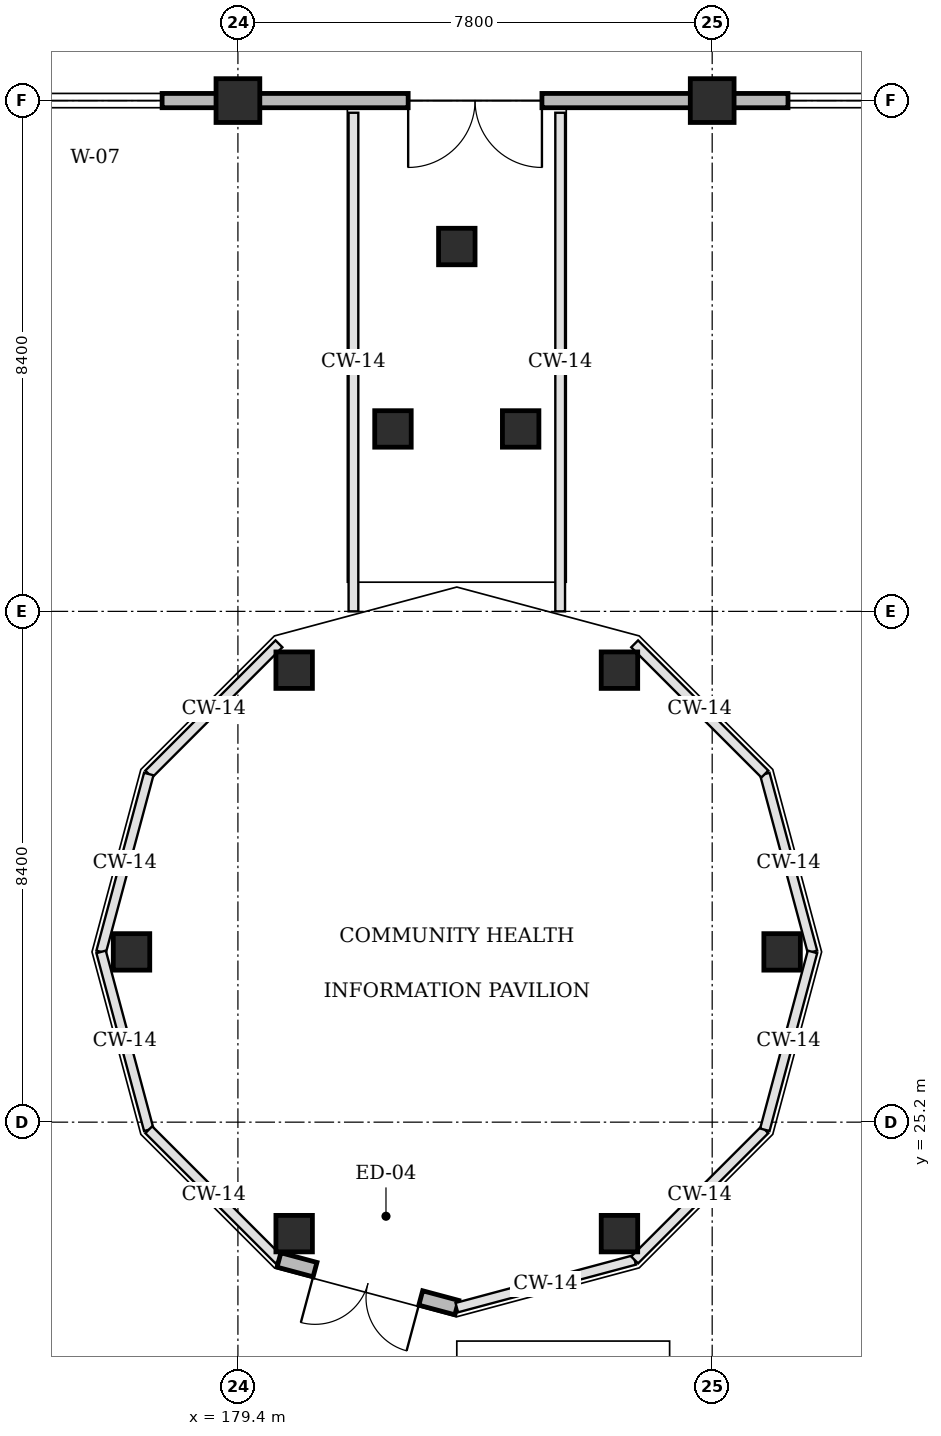
"""IFC4 building model, lengths in metres.
Left out: names, types, materials, properties, quantities, classifications, styles, units other than length and angle.
Written with IfcOpenShell. Run it as: python <this file> out.ifc"""

import sys

from ifc_helpers import new_model, si_unit, direction, frame, frame_2d, origin, origin_2d, place, context, subcontext, project, spatial, rectangle, circle, extrude, element, fill, save


model = new_model("IFC4")
c1 = context("Model", 3, precision=1e-05, world=origin(), true_north=direction((0.0, 1.0)))
c2 = subcontext(c1, "Body", "Model", "MODEL_VIEW")
j1 = project(units=[si_unit("LENGTHUNIT", "METRE"), si_unit("PLANEANGLEUNIT", "RADIAN")], contexts=[c1])
p1 = place(None, origin())
s1 = spatial("IfcSite", under=j1, at=p1, CompositionType="ELEMENT")
p2 = place(p1, origin())
s2 = spatial("IfcBuilding", under=s1, at=p2, CompositionType="ELEMENT")
p3 = place(p2, origin())
s3 = spatial("IfcBuildingStorey", under=s2, at=p3, CompositionType="ELEMENT", Elevation=0.0)
for number, where, z_axis, x_axis in (
    (1, (179.4, 42.0, 0.0), (0.0, 0.0, 1.0), (1.0, 0.0, 0.0)),
    (2, (187.2, 42.0, 0.0), (0.0, 0.0, 1.0), (1.0, 0.0, 0.0)),
):
    element("IfcColumn", number, at=place(p3, frame(where, z_axis=z_axis, x_axis=x_axis)), inside=s3, PredefinedType="COLUMN", context=c2, shape_type="SweptSolid", body=[
        extrude(rectangle(XDim=0.72, YDim=0.72, at=origin_2d()), origin(), (0.0, 0.0, 1.0), 4.8),
    ])
for number, where, z_axis, x_axis in (
    (3, (188.35, 28.0, -0.3), (0.0, 0.0, 1.0), (1.0, 0.0, 0.0)),
    (4, (185.675, 32.633, -0.3), (0.0, 0.0, 1.0), (1.0, 0.0, 0.0)),
    (5, (180.325, 32.633, -0.3), (0.0, 0.0, 1.0), (1.0, 0.0, 0.0)),
    (6, (177.65, 28.0, -0.3), (0.0, 0.0, 1.0), (1.0, 0.0, 0.0)),
    (7, (180.325, 23.367, -0.3), (0.0, 0.0, 1.0), (1.0, 0.0, 0.0)),
    (8, (185.675, 23.367, -0.3), (0.0, 0.0, 1.0), (1.0, 0.0, 0.0)),
):
    element("IfcColumn", number, at=place(p3, frame(where, z_axis=z_axis, x_axis=x_axis)), inside=s3, PredefinedType="PILASTER", context=c2, shape_type="SweptSolid", body=[
        extrude(circle(Radius=0.3, at=origin_2d()), origin(), (0.0, 0.0, 1.0), 4.84),
    ])
for number, where, z_axis, x_axis in (
    (9, (181.95, 36.6, -0.3), (0.0, 0.0, 1.0), (1.0, 0.0, 0.0)),
    (10, (184.05, 36.6, -0.3), (0.0, 0.0, 1.0), (1.0, 0.0, 0.0)),
    (11, (183.0, 39.6, -0.3), (0.0, 0.0, 1.0), (1.0, 0.0, 0.0)),
):
    element("IfcColumn", number, at=place(p3, frame(where, z_axis=z_axis, x_axis=x_axis)), inside=s3, PredefinedType="PILASTER", context=c2, shape_type="SweptSolid", body=[
        extrude(circle(Radius=0.3, at=origin_2d()), origin(), (0.0, 0.0, 1.0), 4.58),
    ])
p4 = place(p3, frame((179.06, 42.0, 0.0), z_axis=(0.0, 0.0, 1.0), x_axis=(-1.0, 0.0, 0.0)))
e12 = element("IfcWall", 12, at=p4, inside=s3, PredefinedType="STANDARD", context=c2, shape_type="SweptSolid", body=[
    extrude(rectangle(XDim=7.12, YDim=0.235, at=frame_2d((3.56, 0.0))), origin(), (0.0, 0.0, 1.0), 3.63),
])
p5 = place(p4, frame((0.907, 0.0, 0.9)))
e13 = element("IfcOpeningElement", 13, at=p5, cuts=e12, PredefinedType="OPENING", context=c2, shape_type="SweptSolid", body=[
    extrude(rectangle(XDim=2.2, YDim=1.65, at=frame_2d((1.1, 0.825))), frame((0.0, 0.127, 0.0), z_axis=(0.0, -1.0, 0.0), x_axis=(1.0, 0.0, 0.0)), (0.0, 0.0, 1.0), 0.255),
])
p6 = place(p4, frame((4.013, 0.0, 0.9)))
e14 = element("IfcOpeningElement", 14, at=p6, cuts=e12, PredefinedType="OPENING", context=c2, shape_type="SweptSolid", body=[
    extrude(rectangle(XDim=2.2, YDim=1.65, at=frame_2d((1.1, 0.825))), frame((0.0, 0.127, 0.0), z_axis=(0.0, -1.0, 0.0), x_axis=(1.0, 0.0, 0.0)), (0.0, 0.0, 1.0), 0.255),
])
p7 = place(p3, frame((186.86, 42.0, 0.0), z_axis=(0.0, 0.0, 1.0), x_axis=(-1.0, 0.0, 0.0)))
e15 = element("IfcWall", 15, at=p7, inside=s3, PredefinedType="STANDARD", context=c2, shape_type="SweptSolid", body=[
    extrude(rectangle(XDim=7.12, YDim=0.235, at=frame_2d((3.56, 0.0))), origin(), (0.0, 0.0, 1.0), 3.63),
])
p8 = place(p7, frame((2.46, 0.0, 0.0)))
e16 = element("IfcOpeningElement", 16, at=p8, cuts=e15, PredefinedType="OPENING", context=c2, shape_type="SweptSolid", body=[
    extrude(rectangle(XDim=2.2, YDim=2.35, at=frame_2d((1.1, 1.175))), frame((0.0, 0.127, 0.0), z_axis=(0.0, -1.0, 0.0), x_axis=(1.0, 0.0, 0.0)), (0.0, 0.0, 1.0), 0.255),
])
p9 = place(p3, frame((194.66, 42.0, 0.0), z_axis=(0.0, 0.0, 1.0), x_axis=(-1.0, 0.0, 0.0)))
e17 = element("IfcWall", 17, at=p9, inside=s3, PredefinedType="STANDARD", context=c2, shape_type="SweptSolid", body=[
    extrude(rectangle(XDim=7.12, YDim=0.235, at=frame_2d((3.56, 0.0))), origin(), (0.0, 0.0, 1.0), 3.63),
])
p10 = place(p9, frame((0.907, 0.0, 0.9)))
e18 = element("IfcOpeningElement", 18, at=p10, cuts=e17, PredefinedType="OPENING", context=c2, shape_type="SweptSolid", body=[
    extrude(rectangle(XDim=2.2, YDim=1.65, at=frame_2d((1.1, 0.825))), frame((0.0, 0.127, 0.0), z_axis=(0.0, -1.0, 0.0), x_axis=(1.0, 0.0, 0.0)), (0.0, 0.0, 1.0), 0.255),
])
p11 = place(p9, frame((4.013, 0.0, 0.9)))
e19 = element("IfcOpeningElement", 19, at=p11, cuts=e17, PredefinedType="OPENING", context=c2, shape_type="SweptSolid", body=[
    extrude(rectangle(XDim=2.2, YDim=1.65, at=frame_2d((1.1, 0.825))), frame((0.0, 0.127, 0.0), z_axis=(0.0, -1.0, 0.0), x_axis=(1.0, 0.0, 0.0)), (0.0, 0.0, 1.0), 0.255),
])
p12 = place(p3, frame((183.0, 22.15, 0.0), z_axis=(0.0, 0.0, 1.0), x_axis=(-0.965911701678, 0.258871753116, 0.0)))
e20 = element("IfcWall", 20, at=p12, inside=s3, PredefinedType="STANDARD", context=c2, shape_type="SweptSolid", body=[
    extrude(rectangle(XDim=3.028, YDim=0.245, at=frame_2d((1.514, 0.0))), origin(), (0.0, 0.0, 1.0), 3.63),
])
p13 = place(p12, frame((0.614, 0.0, 0.0)))
e21 = element("IfcOpeningElement", 21, at=p13, cuts=e20, PredefinedType="OPENING", context=c2, shape_type="SweptSolid", body=[
    extrude(rectangle(XDim=1.8, YDim=2.25, at=frame_2d((0.9, 1.125))), frame((0.0, 0.133, 0.0), z_axis=(0.0, -1.0, 0.0), x_axis=(1.0, 0.0, 0.0)), (0.0, 0.0, 1.0), 0.265),
])
p14 = place(p5, origin())
e22 = element("IfcWindow", 22, at=p14, inside=s3, PartitioningType="SINGLE_PANEL", PredefinedType="WINDOW", context=c2, shape_type="SweptSolid", body=[
    extrude(rectangle(XDim=2.2, YDim=1.65, at=frame_2d((1.1, 0.825))), frame((0.0, 0.03, 0.0), z_axis=(0.0, -1.0, 0.0), x_axis=(1.0, 0.0, 0.0)), (0.0, 0.0, 1.0), 0.06),
])
fill(e13, e22)
p15 = place(p8, origin())
e23 = element("IfcDoor", 23, at=p15, inside=s3, OperationType="DOUBLE_DOOR_SINGLE_SWING", PredefinedType="DOOR", context=c2, shape_type="SweptSolid", body=[
    extrude(rectangle(XDim=2.2, YDim=2.35, at=frame_2d((1.1, 1.175))), frame((0.0, 0.025, 0.0), z_axis=(0.0, -1.0, 0.0), x_axis=(1.0, 0.0, 0.0)), (0.0, 0.0, 1.0), 0.05),
])
fill(e16, e23)
p16 = place(p11, origin())
e24 = element("IfcWindow", 24, at=p16, inside=s3, PartitioningType="SINGLE_PANEL", PredefinedType="WINDOW", context=c2, shape_type="SweptSolid", body=[
    extrude(rectangle(XDim=2.2, YDim=1.65, at=frame_2d((1.1, 0.825))), frame((0.0, 0.03, 0.0), z_axis=(0.0, -1.0, 0.0), x_axis=(1.0, 0.0, 0.0)), (0.0, 0.0, 1.0), 0.06),
])
fill(e19, e24)
p17 = place(p13, origin())
e25 = element("IfcDoor", 25, at=p17, inside=s3, OperationType="DOUBLE_DOOR_SINGLE_SWING", PredefinedType="DOOR", context=c2, shape_type="SweptSolid", body=[
    extrude(rectangle(XDim=1.8, YDim=2.25, at=frame_2d((0.9, 1.125))), frame((0.0, 0.025, 0.0), z_axis=(0.0, -1.0, 0.0), x_axis=(1.0, 0.0, 0.0)), (0.0, 0.0, 1.0), 0.05),
])
fill(e21, e25)
save(model, sys.argv[1])
